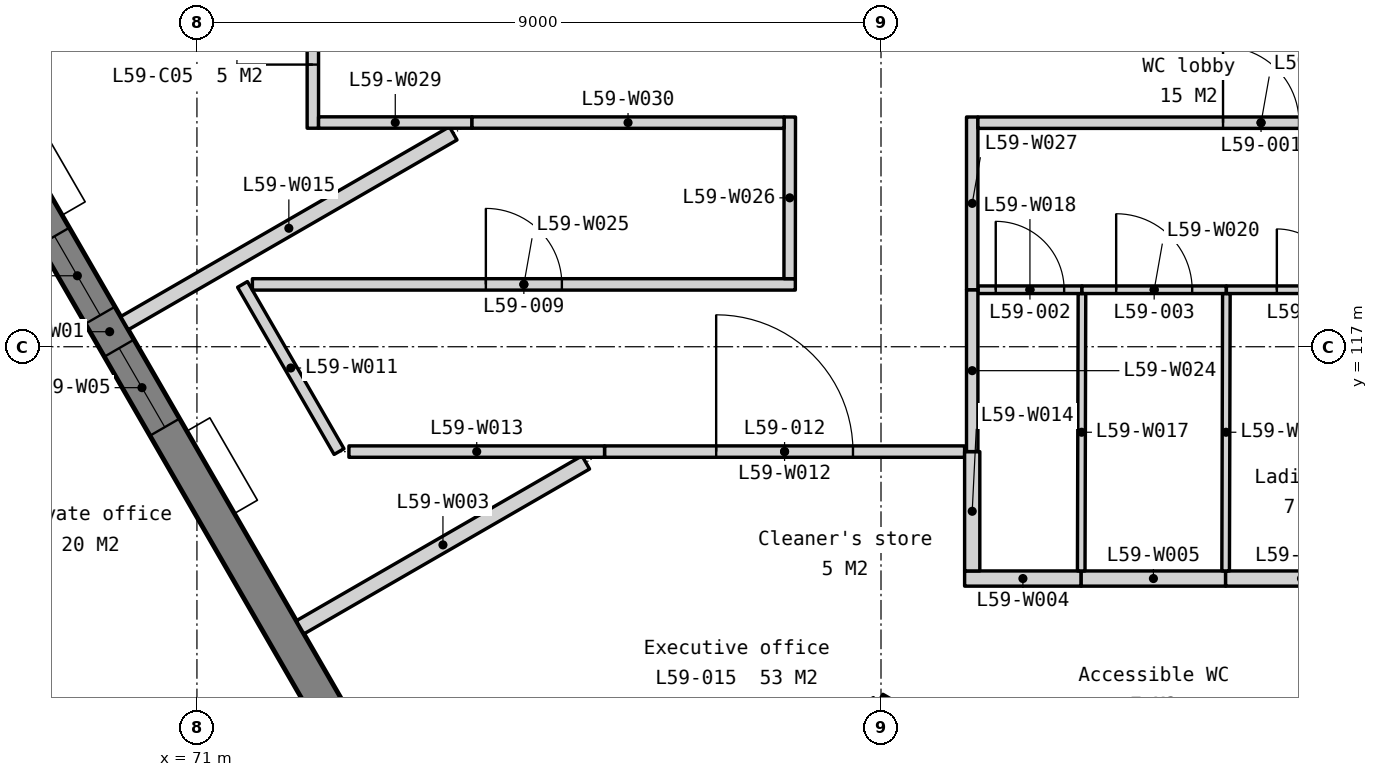
"""IFC4 building model, lengths in metres.
Left out: names, types, materials, properties, quantities, classifications, styles, units other than length and angle.
Written with IfcOpenShell. Run it as: python <this file> out.ifc"""

import sys

from ifc_helpers import new_model, si_unit, direction, frame, frame_2d, origin, place, context, subcontext, project, spatial, polyline, rectangle, outline, extrude, element, fill, save


model = new_model("IFC4")
c1 = context("Model", 3, precision=1e-05, world=origin(), true_north=direction((0.0, 1.0)))
c2 = subcontext(c1, "Body", "Model", "MODEL_VIEW")
j1 = project(units=[si_unit("LENGTHUNIT", "METRE"), si_unit("PLANEANGLEUNIT", "RADIAN")], contexts=[c1])
p1 = place(None, origin())
s1 = spatial("IfcSite", under=j1, at=p1, CompositionType="ELEMENT")
p2 = place(p1, origin())
s2 = spatial("IfcBuilding", under=s1, at=p2, CompositionType="ELEMENT")
p3 = place(p2, frame((0.0, 0.0, 242.6)))
s3 = spatial("IfcBuildingStorey", under=s2, at=p3, CompositionType="ELEMENT", Elevation=242.6)
p4 = place(p3, frame((60.609, 133.207, -0.15), z_axis=(0.0, 0.0, 1.0), x_axis=(0.500002536638, -0.866023939251, 0.0)))
e1 = element("IfcWall", 1, at=p4, inside=s3, PredefinedType="SOLIDWALL", context=c2, shape_type="SweptSolid", body=[
    extrude(outline(polyline([(36.972, 0.0), (36.972, 3.9), (0.0, 3.9), (0.0, 0.0), (36.972, 0.0)])), frame((0.0, 0.225, 0.0), z_axis=(0.0, -1.0, 0.0), x_axis=(1.0, 0.0, 0.0)), (0.0, 0.0, 1.0), 0.45),
])
p5 = place(p4, frame((0.715, 0.0, 0.95)))
e2 = element("IfcOpeningElement", 2, at=p5, cuts=e1, PredefinedType="OPENING", context=c2, shape_type="SweptSolid", body=[
    extrude(rectangle(XDim=1.2, YDim=2.2, at=frame_2d((0.6, 1.1))), frame((0.0, 0.235, 0.0), z_axis=(0.0, -1.0, 0.0), x_axis=(1.0, 0.0, 0.0)), (0.0, 0.0, 1.0), 0.47),
])
p6 = place(p4, frame((7.793, 0.0, 0.95)))
e3 = element("IfcOpeningElement", 3, at=p6, cuts=e1, PredefinedType="OPENING", context=c2, shape_type="SweptSolid", body=[
    extrude(rectangle(XDim=1.2, YDim=2.2, at=frame_2d((0.6, 1.1))), frame((0.0, 0.235, 0.0), z_axis=(0.0, -1.0, 0.0), x_axis=(1.0, 0.0, 0.0)), (0.0, 0.0, 1.0), 0.47),
])
p7 = place(p4, frame((9.493, 0.0, 0.95)))
e4 = element("IfcOpeningElement", 4, at=p7, cuts=e1, PredefinedType="OPENING", context=c2, shape_type="SweptSolid", body=[
    extrude(rectangle(XDim=1.2, YDim=2.2, at=frame_2d((0.6, 1.1))), frame((0.0, 0.235, 0.0), z_axis=(0.0, -1.0, 0.0), x_axis=(1.0, 0.0, 0.0)), (0.0, 0.0, 1.0), 0.47),
])
p8 = place(p4, frame((17.036, 0.0, 0.95)))
e5 = element("IfcOpeningElement", 5, at=p8, cuts=e1, PredefinedType="OPENING", context=c2, shape_type="SweptSolid", body=[
    extrude(rectangle(XDim=1.2, YDim=2.2, at=frame_2d((0.6, 1.1))), frame((0.0, 0.235, 0.0), z_axis=(0.0, -1.0, 0.0), x_axis=(1.0, 0.0, 0.0)), (0.0, 0.0, 1.0), 0.47),
])
p9 = place(p4, frame((18.736, 0.0, 0.95)))
e6 = element("IfcOpeningElement", 6, at=p9, cuts=e1, PredefinedType="OPENING", context=c2, shape_type="SweptSolid", body=[
    extrude(rectangle(XDim=1.2, YDim=2.2, at=frame_2d((0.6, 1.1))), frame((0.0, 0.235, 0.0), z_axis=(0.0, -1.0, 0.0), x_axis=(1.0, 0.0, 0.0)), (0.0, 0.0, 1.0), 0.47),
])
p10 = place(p4, frame((26.279, 0.0, 0.95)))
e7 = element("IfcOpeningElement", 7, at=p10, cuts=e1, PredefinedType="OPENING", context=c2, shape_type="SweptSolid", body=[
    extrude(rectangle(XDim=1.2, YDim=2.2, at=frame_2d((0.6, 1.1))), frame((0.0, 0.235, 0.0), z_axis=(0.0, -1.0, 0.0), x_axis=(1.0, 0.0, 0.0)), (0.0, 0.0, 1.0), 0.47),
])
p11 = place(p4, frame((27.979, 0.0, 0.95)))
e8 = element("IfcOpeningElement", 8, at=p11, cuts=e1, PredefinedType="OPENING", context=c2, shape_type="SweptSolid", body=[
    extrude(rectangle(XDim=1.2, YDim=2.2, at=frame_2d((0.6, 1.1))), frame((0.0, 0.235, 0.0), z_axis=(0.0, -1.0, 0.0), x_axis=(1.0, 0.0, 0.0)), (0.0, 0.0, 1.0), 0.47),
])
p12 = place(p4, frame((35.058, 0.0, 0.95)))
e9 = element("IfcOpeningElement", 9, at=p12, cuts=e1, PredefinedType="OPENING", context=c2, shape_type="SweptSolid", body=[
    extrude(rectangle(XDim=1.2, YDim=2.2, at=frame_2d((0.6, 1.1))), frame((0.0, 0.235, 0.0), z_axis=(0.0, -1.0, 0.0), x_axis=(1.0, 0.0, 0.0)), (0.0, 0.0, 1.0), 0.47),
])
p13 = place(p3, frame((80.905, 101.188, -0.15), z_axis=(0.0, 0.0, 1.0), x_axis=(0.500002536638, 0.866023939251, 0.0)))
e10 = element("IfcWall", 10, at=p13, inside=s3, PredefinedType="SOLIDWALL", context=c2, shape_type="SweptSolid", body=[
    extrude(outline(polyline([(36.972, 0.0), (36.972, 3.9), (0.0, 3.9), (0.0, 0.0), (36.972, 0.0)])), frame((0.0, 0.225, 0.0), z_axis=(0.0, -1.0, 0.0), x_axis=(1.0, 0.0, 0.0)), (0.0, 0.0, 1.0), 0.45),
])
p14 = place(p13, frame((0.715, 0.0, 0.95)))
e11 = element("IfcOpeningElement", 11, at=p14, cuts=e10, PredefinedType="OPENING", context=c2, shape_type="SweptSolid", body=[
    extrude(rectangle(XDim=1.2, YDim=2.2, at=frame_2d((0.6, 1.1))), frame((0.0, 0.235, 0.0), z_axis=(0.0, -1.0, 0.0), x_axis=(1.0, 0.0, 0.0)), (0.0, 0.0, 1.0), 0.47),
])
p15 = place(p13, frame((7.793, 0.0, 0.95)))
e12 = element("IfcOpeningElement", 12, at=p15, cuts=e10, PredefinedType="OPENING", context=c2, shape_type="SweptSolid", body=[
    extrude(rectangle(XDim=1.2, YDim=2.2, at=frame_2d((0.6, 1.1))), frame((0.0, 0.235, 0.0), z_axis=(0.0, -1.0, 0.0), x_axis=(1.0, 0.0, 0.0)), (0.0, 0.0, 1.0), 0.47),
])
p16 = place(p13, frame((9.493, 0.0, 0.95)))
e13 = element("IfcOpeningElement", 13, at=p16, cuts=e10, PredefinedType="OPENING", context=c2, shape_type="SweptSolid", body=[
    extrude(rectangle(XDim=1.2, YDim=2.2, at=frame_2d((0.6, 1.1))), frame((0.0, 0.235, 0.0), z_axis=(0.0, -1.0, 0.0), x_axis=(1.0, 0.0, 0.0)), (0.0, 0.0, 1.0), 0.47),
])
p17 = place(p13, frame((17.036, 0.0, 0.95)))
e14 = element("IfcOpeningElement", 14, at=p17, cuts=e10, PredefinedType="OPENING", context=c2, shape_type="SweptSolid", body=[
    extrude(rectangle(XDim=1.2, YDim=2.2, at=frame_2d((0.6, 1.1))), frame((0.0, 0.235, 0.0), z_axis=(0.0, -1.0, 0.0), x_axis=(1.0, 0.0, 0.0)), (0.0, 0.0, 1.0), 0.47),
])
p18 = place(p13, frame((18.736, 0.0, 0.95)))
e15 = element("IfcOpeningElement", 15, at=p18, cuts=e10, PredefinedType="OPENING", context=c2, shape_type="SweptSolid", body=[
    extrude(rectangle(XDim=1.2, YDim=2.2, at=frame_2d((0.6, 1.1))), frame((0.0, 0.235, 0.0), z_axis=(0.0, -1.0, 0.0), x_axis=(1.0, 0.0, 0.0)), (0.0, 0.0, 1.0), 0.47),
])
p19 = place(p13, frame((26.279, 0.0, 0.95)))
e16 = element("IfcOpeningElement", 16, at=p19, cuts=e10, PredefinedType="OPENING", context=c2, shape_type="SweptSolid", body=[
    extrude(rectangle(XDim=1.2, YDim=2.2, at=frame_2d((0.6, 1.1))), frame((0.0, 0.235, 0.0), z_axis=(0.0, -1.0, 0.0), x_axis=(1.0, 0.0, 0.0)), (0.0, 0.0, 1.0), 0.47),
])
p20 = place(p13, frame((27.979, 0.0, 0.95)))
e17 = element("IfcOpeningElement", 17, at=p20, cuts=e10, PredefinedType="OPENING", context=c2, shape_type="SweptSolid", body=[
    extrude(rectangle(XDim=1.2, YDim=2.2, at=frame_2d((0.6, 1.1))), frame((0.0, 0.235, 0.0), z_axis=(0.0, -1.0, 0.0), x_axis=(1.0, 0.0, 0.0)), (0.0, 0.0, 1.0), 0.47),
])
p21 = place(p13, frame((35.058, 0.0, 0.95)))
e18 = element("IfcOpeningElement", 18, at=p21, cuts=e10, PredefinedType="OPENING", context=c2, shape_type="SweptSolid", body=[
    extrude(rectangle(XDim=1.2, YDim=2.2, at=frame_2d((0.6, 1.1))), frame((0.0, 0.235, 0.0), z_axis=(0.0, -1.0, 0.0), x_axis=(1.0, 0.0, 0.0)), (0.0, 0.0, 1.0), 0.47),
])
p22 = place(p3, frame((80.0, 112.384, 0.0), z_axis=(0.0, 0.0, 1.0), x_axis=(0.866021154418, -0.500007360046, 0.0)))
e19 = element("IfcWall", 19, at=p22, inside=s3, PredefinedType="PARTITIONING", context=c2, shape_type="SweptSolid", body=[
    extrude(rectangle(XDim=6.157, YDim=0.1, at=frame_2d((3.078, 0.0))), origin(), (0.0, 0.0, 1.0), 3.75),
])
p23 = place(p22, frame((2.578, 0.0, 0.0)))
e20 = element("IfcOpeningElement", 20, at=p23, cuts=e19, PredefinedType="OPENING", context=c2, shape_type="SweptSolid", body=[
    extrude(rectangle(XDim=1.0, YDim=2.1, at=frame_2d((0.5, 1.05))), frame((0.0, 0.06, 0.0), z_axis=(0.0, -1.0, 0.0), x_axis=(1.0, 0.0, 0.0)), (0.0, 0.0, 1.0), 0.12),
])
p24 = place(p3, frame((72.357, 113.308, 0.0), z_axis=(0.0, 0.0, 1.0), x_axis=(0.866032891431, 0.499987030792, 0.0)))
e21 = element("IfcWall", 21, at=p24, inside=s3, PredefinedType="PARTITIONING", context=c2, shape_type="SweptSolid", body=[
    extrude(rectangle(XDim=4.34, YDim=0.2, at=frame_2d((2.17, 0.0))), origin(), (0.0, 0.0, 1.0), 3.75),
])
p25 = place(p3, frame((81.1, 113.95, 0.0), z_axis=(0.0, 0.0, 1.0), x_axis=(1.0, 0.0, 0.0)))
e22 = element("IfcWall", 22, at=p25, inside=s3, PredefinedType="PARTITIONING", context=c2, shape_type="SweptSolid", body=[
    extrude(rectangle(XDim=1.534, YDim=0.2, at=frame_2d((0.767, 0.0))), origin(), (0.0, 0.0, 1.0), 3.75),
])
p26 = place(p3, frame((82.634, 113.95, 0.0), z_axis=(0.0, 0.0, 1.0), x_axis=(1.0, 0.0, 0.0)))
e23 = element("IfcWall", 23, at=p26, inside=s3, PredefinedType="PARTITIONING", context=c2, shape_type="SweptSolid", body=[
    extrude(rectangle(XDim=1.9, YDim=0.2, at=frame_2d((0.95, 0.0))), origin(), (0.0, 0.0, 1.0), 3.75),
])
p27 = place(p3, frame((84.534, 113.95, 0.0), z_axis=(0.0, 0.0, 1.0), x_axis=(1.0, 0.0, 0.0)))
e24 = element("IfcWall", 24, at=p27, inside=s3, PredefinedType="PARTITIONING", context=c2, shape_type="SweptSolid", body=[
    extrude(rectangle(XDim=1.997, YDim=0.2, at=frame_2d((0.998, 0.0))), origin(), (0.0, 0.0, 1.0), 3.75),
])
p28 = place(p3, frame((71.6, 117.82, 0.0), z_axis=(0.0, 0.0, 1.0), x_axis=(0.500035802948, -0.866004731956, 0.0)))
e25 = element("IfcWall", 25, at=p28, inside=s3, PredefinedType="PARTITIONING", context=c2, shape_type="SweptSolid", body=[
    extrude(rectangle(XDim=2.54, YDim=0.15, at=frame_2d((1.27, 0.0))), origin(), (0.0, 0.0, 1.0), 3.75),
])
p29 = place(p3, frame((76.363, 115.62, 0.0), z_axis=(0.0, 0.0, 1.0), x_axis=(1.0, 0.0, 0.0)))
e26 = element("IfcWall", 26, at=p29, inside=s3, PredefinedType="PARTITIONING", context=c2, shape_type="SweptSolid", body=[
    extrude(rectangle(XDim=4.737, YDim=0.15, at=frame_2d((2.369, 0.0))), origin(), (0.0, 0.0, 1.0), 3.75),
])
p30 = place(p29, frame((1.469, 0.0, 0.0)))
e27 = element("IfcOpeningElement", 27, at=p30, cuts=e26, PredefinedType="OPENING", context=c2, shape_type="SweptSolid", body=[
    extrude(rectangle(XDim=1.8, YDim=2.1, at=frame_2d((0.9, 1.05))), frame((0.0, 0.085, 0.0), z_axis=(0.0, -1.0, 0.0), x_axis=(1.0, 0.0, 0.0)), (0.0, 0.0, 1.0), 0.17),
])
p31 = place(p3, frame((73.0, 115.62, 0.0), z_axis=(0.0, 0.0, 1.0), x_axis=(1.0, 0.0, 0.0)))
e28 = element("IfcWall", 28, at=p31, inside=s3, PredefinedType="PARTITIONING", context=c2, shape_type="SweptSolid", body=[
    extrude(rectangle(XDim=3.363, YDim=0.15, at=frame_2d((1.682, 0.0))), origin(), (0.0, 0.0, 1.0), 3.75),
])
p32 = place(p3, frame((81.2, 114.05, 0.0), z_axis=(0.0, 0.0, 1.0), x_axis=(0.0, 1.0, 0.0)))
e29 = element("IfcWall", 29, at=p32, inside=s3, PredefinedType="PARTITIONING", context=c2, shape_type="SweptSolid", body=[
    extrude(rectangle(XDim=1.57, YDim=0.2, at=frame_2d((0.785, 0.0))), origin(), (0.0, 0.0, 1.0), 3.75),
])
p33 = place(p3, frame((70.047, 117.31, 0.0), z_axis=(0.0, 0.0, 1.0), x_axis=(0.866032544947, 0.499987630939, 0.0)))
e30 = element("IfcWall", 30, at=p33, inside=s3, PredefinedType="PARTITIONING", context=c2, shape_type="SweptSolid", body=[
    extrude(rectangle(XDim=4.994, YDim=0.2, at=frame_2d((2.497, 0.0))), origin(), (0.0, 0.0, 1.0), 3.75),
])
p34 = place(p3, frame((82.634, 114.05, 0.0), z_axis=(0.0, 0.0, 1.0), x_axis=(0.002608686776, 0.999996597371, 0.0)))
e31 = element("IfcWall", 31, at=p34, inside=s3, PredefinedType="PARTITIONING", context=c2, shape_type="SweptSolid", body=[
    extrude(rectangle(XDim=3.65, YDim=0.1, at=frame_2d((1.825, 0.0))), origin(), (0.0, 0.0, 1.0), 3.75),
])
p35 = place(p3, frame((81.275, 117.75, 0.0), z_axis=(0.0, 0.0, 1.0), x_axis=(1.0, 0.0, 0.0)))
e32 = element("IfcWall", 32, at=p35, inside=s3, PredefinedType="PARTITIONING", context=c2, shape_type="SweptSolid", body=[
    extrude(rectangle(XDim=1.369, YDim=0.1, at=frame_2d((0.685, 0.0))), origin(), (0.0, 0.0, 1.0), 3.75),
])
p36 = place(p35, frame((0.235, 0.0, 0.0)))
e33 = element("IfcOpeningElement", 33, at=p36, cuts=e32, PredefinedType="OPENING", context=c2, shape_type="SweptSolid", body=[
    extrude(rectangle(XDim=0.9, YDim=2.1, at=frame_2d((0.45, 1.05))), frame((0.0, 0.06, 0.0), z_axis=(0.0, -1.0, 0.0), x_axis=(1.0, 0.0, 0.0)), (0.0, 0.0, 1.0), 0.12),
])
p37 = place(p3, frame((84.534, 114.05, 0.0), z_axis=(0.0, 0.0, 1.0), x_axis=(0.002675575707, 0.999996420641, 0.0)))
e34 = element("IfcWall", 34, at=p37, inside=s3, PredefinedType="PARTITIONING", context=c2, shape_type="SweptSolid", body=[
    extrude(rectangle(XDim=3.65, YDim=0.1, at=frame_2d((1.825, 0.0))), origin(), (0.0, 0.0, 1.0), 3.75),
])
p38 = place(p3, frame((82.644, 117.75, 0.0), z_axis=(0.0, 0.0, 1.0), x_axis=(1.0, 0.0, 0.0)))
e35 = element("IfcWall", 35, at=p38, inside=s3, PredefinedType="PARTITIONING", context=c2, shape_type="SweptSolid", body=[
    extrude(rectangle(XDim=1.9, YDim=0.1, at=frame_2d((0.95, 0.0))), origin(), (0.0, 0.0, 1.0), 3.75),
])
p39 = place(p38, frame((0.45, 0.0, 0.0)))
e36 = element("IfcOpeningElement", 36, at=p39, cuts=e35, PredefinedType="OPENING", context=c2, shape_type="SweptSolid", body=[
    extrude(rectangle(XDim=1.0, YDim=2.1, at=frame_2d((0.5, 1.05))), frame((0.0, 0.06, 0.0), z_axis=(0.0, -1.0, 0.0), x_axis=(1.0, 0.0, 0.0)), (0.0, 0.0, 1.0), 0.12),
])
p40 = place(p3, frame((84.544, 117.75, 0.0), z_axis=(0.0, 0.0, 1.0), x_axis=(1.0, 0.0, 0.0)))
e37 = element("IfcWall", 37, at=p40, inside=s3, PredefinedType="PARTITIONING", context=c2, shape_type="SweptSolid", body=[
    extrude(rectangle(XDim=2.128, YDim=0.1, at=frame_2d((1.064, 0.0))), origin(), (0.0, 0.0, 1.0), 3.75),
])
p41 = place(p40, frame((0.664, 0.0, 0.0)))
e38 = element("IfcOpeningElement", 38, at=p41, cuts=e37, PredefinedType="OPENING", context=c2, shape_type="SweptSolid", body=[
    extrude(rectangle(XDim=0.8, YDim=2.1, at=frame_2d((0.4, 1.05))), frame((0.0, 0.06, 0.0), z_axis=(0.0, -1.0, 0.0), x_axis=(1.0, 0.0, 0.0)), (0.0, 0.0, 1.0), 0.12),
])
p42 = place(p3, frame((81.2, 115.62, 0.0), z_axis=(0.0, 0.0, 1.0), x_axis=(0.0, 1.0, 0.0)))
e39 = element("IfcWall", 39, at=p42, inside=s3, PredefinedType="PARTITIONING", context=c2, shape_type="SweptSolid", body=[
    extrude(rectangle(XDim=2.13, YDim=0.15, at=frame_2d((1.065, 0.0))), origin(), (0.0, 0.0, 1.0), 3.75),
])
p43 = place(p3, frame((71.729, 117.82, 0.0), z_axis=(0.0, 0.0, 1.0), x_axis=(1.0, 0.0, 0.0)))
e40 = element("IfcWall", 40, at=p43, inside=s3, PredefinedType="PARTITIONING", context=c2, shape_type="SweptSolid", body=[
    extrude(rectangle(XDim=7.144, YDim=0.15, at=frame_2d((3.572, 0.0))), origin(), (0.0, 0.0, 1.0), 3.75),
])
p44 = place(p43, frame((3.072, 0.0, 0.0)))
e41 = element("IfcOpeningElement", 41, at=p44, cuts=e40, PredefinedType="OPENING", context=c2, shape_type="SweptSolid", body=[
    extrude(rectangle(XDim=1.0, YDim=2.1, at=frame_2d((0.5, 1.05))), frame((0.0, 0.085, 0.0), z_axis=(0.0, -1.0, 0.0), x_axis=(1.0, 0.0, 0.0)), (0.0, 0.0, 1.0), 0.17),
])
p45 = place(p3, frame((78.798, 117.895, 0.0), z_axis=(0.0, 0.0, 1.0), x_axis=(0.000917957158, 0.999999578677, 0.0)))
e42 = element("IfcWall", 42, at=p45, inside=s3, PredefinedType="PARTITIONING", context=c2, shape_type="SweptSolid", body=[
    extrude(rectangle(XDim=2.128, YDim=0.15, at=frame_2d((1.064, 0.0))), origin(), (0.0, 0.0, 1.0), 3.75),
])
p46 = place(p3, frame((81.2, 117.75, 0.0), z_axis=(0.0, 0.0, 1.0), x_axis=(0.0, 1.0, 0.0)))
e43 = element("IfcWall", 43, at=p46, inside=s3, PredefinedType="PARTITIONING", context=c2, shape_type="SweptSolid", body=[
    extrude(rectangle(XDim=2.273, YDim=0.15, at=frame_2d((1.136, 0.0))), origin(), (0.0, 0.0, 1.0), 3.75),
])
p47 = place(p3, frame((72.525, 119.875, 0.0), z_axis=(0.0, 0.0, 1.0), x_axis=(0.0, 1.0, 0.0)))
e44 = element("IfcWall", 44, at=p47, inside=s3, PredefinedType="PARTITIONING", context=c2, shape_type="SweptSolid", body=[
    extrude(rectangle(XDim=2.675, YDim=0.15, at=frame_2d((1.337, 0.0))), origin(), (0.0, 0.0, 1.0), 3.75),
])
p48 = place(p47, frame((0.837, 0.0, 0.0)))
e45 = element("IfcOpeningElement", 45, at=p48, cuts=e44, PredefinedType="OPENING", context=c2, shape_type="SweptSolid", body=[
    extrude(rectangle(XDim=1.0, YDim=2.1, at=frame_2d((0.5, 1.05))), frame((0.0, 0.085, 0.0), z_axis=(0.0, -1.0, 0.0), x_axis=(1.0, 0.0, 0.0)), (0.0, 0.0, 1.0), 0.17),
])
p49 = place(p3, frame((72.6, 119.95, 0.0), z_axis=(0.0, 0.0, 1.0), x_axis=(1.0, 0.0, 0.0)))
e46 = element("IfcWall", 46, at=p49, inside=s3, PredefinedType="PARTITIONING", context=c2, shape_type="SweptSolid", body=[
    extrude(rectangle(XDim=2.019, YDim=0.15, at=frame_2d((1.009, 0.0))), origin(), (0.0, 0.0, 1.0), 3.75),
])
p50 = place(p3, frame((74.619, 119.95, 0.0), z_axis=(0.0, 0.0, 1.0), x_axis=(0.999999886891, -0.000475624203, 0.0)))
e47 = element("IfcWall", 47, at=p50, inside=s3, PredefinedType="PARTITIONING", context=c2, shape_type="SweptSolid", body=[
    extrude(rectangle(XDim=4.106, YDim=0.15, at=frame_2d((2.053, 0.0))), origin(), (0.0, 0.0, 1.0), 3.75),
])
p51 = place(p3, frame((81.275, 119.948, 0.0), z_axis=(0.0, 0.0, 1.0), x_axis=(1.0, 0.0, 0.0)))
e48 = element("IfcWall", 48, at=p51, inside=s3, PredefinedType="PARTITIONING", context=c2, shape_type="SweptSolid", body=[
    extrude(rectangle(XDim=7.45, YDim=0.15, at=frame_2d((3.725, 0.0))), origin(), (0.0, 0.0, 1.0), 3.75),
])
p52 = place(p51, frame((3.225, 0.0, 0.0)))
e49 = element("IfcOpeningElement", 49, at=p52, cuts=e48, PredefinedType="OPENING", context=c2, shape_type="SweptSolid", body=[
    extrude(rectangle(XDim=1.0, YDim=2.1, at=frame_2d((0.5, 1.05))), frame((0.0, 0.085, 0.0), z_axis=(0.0, -1.0, 0.0), x_axis=(1.0, 0.0, 0.0)), (0.0, 0.0, 1.0), 0.17),
])
p53 = place(p8, origin())
e50 = element("IfcWindow", 50, at=p53, inside=s3, PartitioningType="SINGLE_PANEL", PredefinedType="WINDOW", context=c2, shape_type="SweptSolid", body=[
    extrude(rectangle(XDim=1.2, YDim=2.2, at=frame_2d((0.6, 1.1))), frame((0.0, 0.03, 0.0), z_axis=(0.0, -1.0, 0.0), x_axis=(1.0, 0.0, 0.0)), (0.0, 0.0, 1.0), 0.06),
])
fill(e5, e50)
p54 = place(p9, origin())
e51 = element("IfcWindow", 51, at=p54, inside=s3, PartitioningType="SINGLE_PANEL", PredefinedType="WINDOW", context=c2, shape_type="SweptSolid", body=[
    extrude(rectangle(XDim=1.2, YDim=2.2, at=frame_2d((0.6, 1.1))), frame((0.0, 0.03, 0.0), z_axis=(0.0, -1.0, 0.0), x_axis=(1.0, 0.0, 0.0)), (0.0, 0.0, 1.0), 0.06),
])
fill(e6, e51)
p55 = place(p52, origin())
e52 = element("IfcDoor", 52, at=p55, inside=s3, OperationType="SINGLE_SWING_LEFT", PredefinedType="DOOR", context=c2, shape_type="SweptSolid", body=[
    extrude(rectangle(XDim=1.0, YDim=2.1, at=frame_2d((0.5, 1.05))), frame((0.0, 0.025, 0.0), z_axis=(0.0, -1.0, 0.0), x_axis=(1.0, 0.0, 0.0)), (0.0, 0.0, 1.0), 0.05),
])
fill(e49, e52)
p56 = place(p36, origin())
e53 = element("IfcDoor", 53, at=p56, inside=s3, OperationType="SINGLE_SWING_LEFT", PredefinedType="DOOR", context=c2, shape_type="SweptSolid", body=[
    extrude(rectangle(XDim=0.9, YDim=2.1, at=frame_2d((0.45, 1.05))), frame((0.0, 0.025, 0.0), z_axis=(0.0, -1.0, 0.0), x_axis=(1.0, 0.0, 0.0)), (0.0, 0.0, 1.0), 0.05),
])
fill(e33, e53)
p57 = place(p39, origin())
e54 = element("IfcDoor", 54, at=p57, inside=s3, OperationType="SINGLE_SWING_LEFT", PredefinedType="DOOR", context=c2, shape_type="SweptSolid", body=[
    extrude(rectangle(XDim=1.0, YDim=2.1, at=frame_2d((0.5, 1.05))), frame((0.0, 0.025, 0.0), z_axis=(0.0, -1.0, 0.0), x_axis=(1.0, 0.0, 0.0)), (0.0, 0.0, 1.0), 0.05),
])
fill(e36, e54)
p58 = place(p41, origin())
e55 = element("IfcDoor", 55, at=p58, inside=s3, OperationType="SINGLE_SWING_LEFT", PredefinedType="DOOR", context=c2, shape_type="SweptSolid", body=[
    extrude(rectangle(XDim=0.8, YDim=2.1, at=frame_2d((0.4, 1.05))), frame((0.0, 0.025, 0.0), z_axis=(0.0, -1.0, 0.0), x_axis=(1.0, 0.0, 0.0)), (0.0, 0.0, 1.0), 0.05),
])
fill(e38, e55)
p59 = place(p48, origin())
e56 = element("IfcDoor", 56, at=p59, inside=s3, OperationType="SINGLE_SWING_LEFT", PredefinedType="DOOR", context=c2, shape_type="SweptSolid", body=[
    extrude(rectangle(XDim=1.0, YDim=2.1, at=frame_2d((0.5, 1.05))), frame((0.0, 0.025, 0.0), z_axis=(0.0, -1.0, 0.0), x_axis=(1.0, 0.0, 0.0)), (0.0, 0.0, 1.0), 0.05),
])
fill(e45, e56)
p60 = place(p44, origin())
e57 = element("IfcDoor", 57, at=p60, inside=s3, OperationType="SINGLE_SWING_LEFT", PredefinedType="DOOR", context=c2, shape_type="SweptSolid", body=[
    extrude(rectangle(XDim=1.0, YDim=2.1, at=frame_2d((0.5, 1.05))), frame((0.0, 0.025, 0.0), z_axis=(0.0, -1.0, 0.0), x_axis=(1.0, 0.0, 0.0)), (0.0, 0.0, 1.0), 0.05),
])
fill(e41, e57)
p61 = place(p30, origin())
e58 = element("IfcDoor", 58, at=p61, inside=s3, OperationType="SINGLE_SWING_LEFT", PredefinedType="DOOR", context=c2, shape_type="SweptSolid", body=[
    extrude(rectangle(XDim=1.8, YDim=2.1, at=frame_2d((0.9, 1.05))), frame((0.0, 0.025, 0.0), z_axis=(0.0, -1.0, 0.0), x_axis=(1.0, 0.0, 0.0)), (0.0, 0.0, 1.0), 0.05),
])
fill(e27, e58)
save(model, sys.argv[1])
